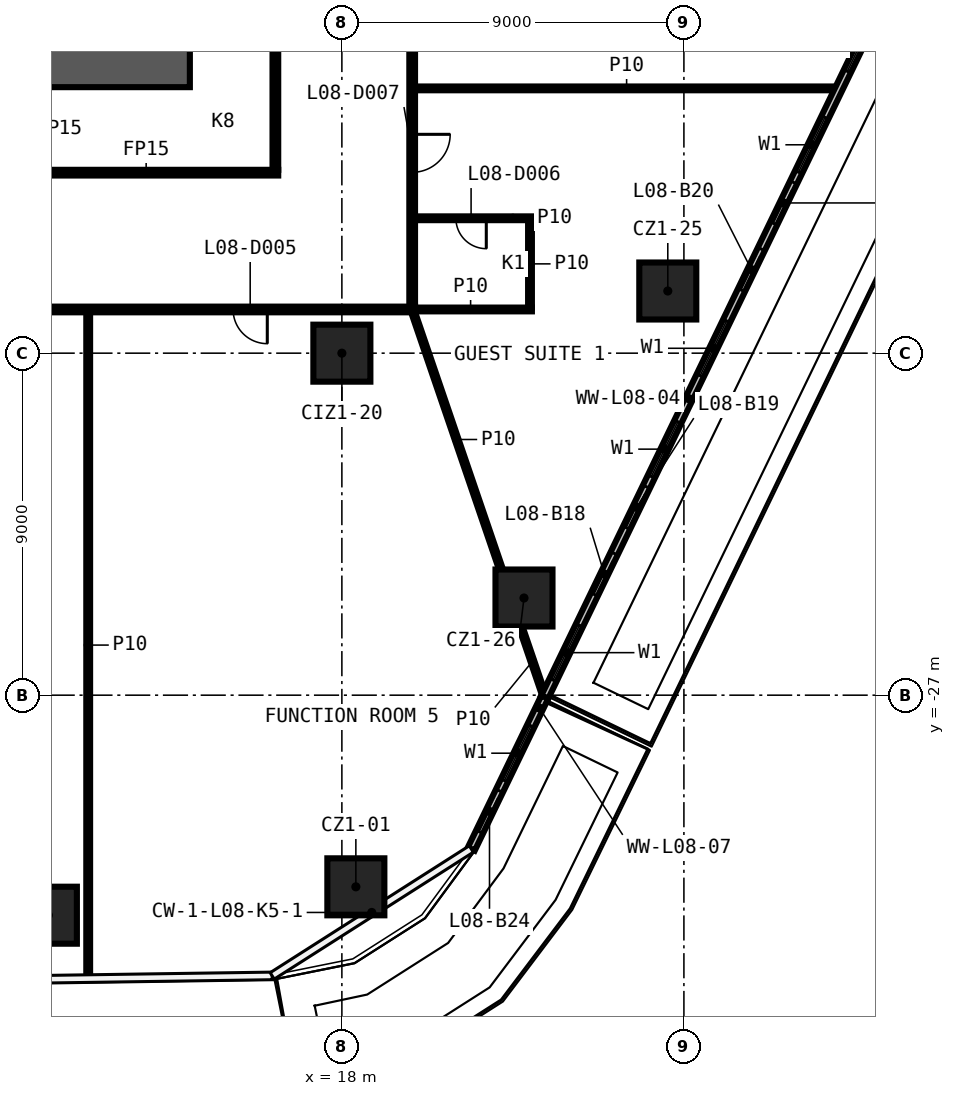
"""IFC4 building model, lengths in metres.
Left out: names, types, materials, properties, quantities, classifications, styles, units other than length and angle.
Written with IfcOpenShell. Run it as: python <this file> out.ifc"""

import sys

from ifc_helpers import new_model, si_unit, direction, frame, frame_2d, origin, origin_2d, place, context, subcontext, project, spatial, rectangle, extrude, element, fill, save


model = new_model("IFC4")
c1 = context("Model", 3, precision=1e-05, world=origin(), true_north=direction((0.0, 1.0)))
c2 = subcontext(c1, "Body", "Model", "MODEL_VIEW")
j1 = project(units=[si_unit("LENGTHUNIT", "METRE"), si_unit("PLANEANGLEUNIT", "RADIAN")], contexts=[c1])
p1 = place(None, origin())
s1 = spatial("IfcSite", under=j1, at=p1, CompositionType="ELEMENT")
p2 = place(p1, origin())
s2 = spatial("IfcBuilding", under=s1, at=p2, CompositionType="ELEMENT")
p3 = place(p2, frame((0.0, 0.0, 51.4)))
s3 = spatial("IfcBuildingStorey", under=s2, at=p3, CompositionType="ELEMENT", Elevation=51.4)
for number, where, z_axis, x_axis in (
    (1, (18.368, -32.043, 0.0), (0.0, 0.0, 1.0), (1.0, 0.0, 0.0)),
    (2, (10.277, -32.79, 0.0), (0.0, 0.0, 1.0), (1.0, 0.0, 0.0)),
    (3, (26.576, -16.364, 0.0), (0.0, 0.0, 1.0), (1.0, 0.0, 0.0)),
    (4, (22.792, -24.443, 0.0), (0.0, 0.0, 1.0), (1.0, 0.0, 0.0)),
    (5, (18.0, -18.0, 0.0), (0.0, 0.0, 1.0), (1.0, 0.0, 0.0)),
):
    element("IfcColumn", number, at=place(p3, frame(where, z_axis=z_axis, x_axis=x_axis)), inside=s3, PredefinedType="COLUMN", context=c2, shape_type="SweptSolid", body=[
        extrude(rectangle(XDim=1.5, YDim=1.5, at=origin_2d()), origin(), (0.0, 0.0, 1.0), 3.3),
    ])
p4 = place(p3, frame((19.925, -16.85, 0.0), z_axis=(0.0, 0.0, 1.0), x_axis=(-1.0, 0.0, 0.0)))
e6 = element("IfcWall", 6, at=p4, inside=s3, PredefinedType="PARTITIONING", context=c2, shape_type="SweptSolid", body=[
    extrude(rectangle(XDim=39.85, YDim=0.15, at=frame_2d((19.925, 0.0))), origin(), (0.0, 0.0, 1.0), 3.3),
])
p5 = place(p4, frame((31.008, 0.0, 0.0)))
e7 = element("IfcOpeningElement", 7, at=p5, cuts=e6, PredefinedType="OPENING", context=c2, shape_type="SweptSolid", body=[
    extrude(rectangle(XDim=0.9, YDim=2.1, at=frame_2d((0.45, 1.05))), frame((0.0, 0.085, 0.0), z_axis=(0.0, -1.0, 0.0), x_axis=(1.0, 0.0, 0.0)), (0.0, 0.0, 1.0), 0.17),
])
p6 = place(p4, frame((22.704, 0.0, 0.0)))
e8 = element("IfcOpeningElement", 8, at=p6, cuts=e6, PredefinedType="OPENING", context=c2, shape_type="SweptSolid", body=[
    extrude(rectangle(XDim=0.9, YDim=2.1, at=frame_2d((0.45, 1.05))), frame((0.0, 0.085, 0.0), z_axis=(0.0, -1.0, 0.0), x_axis=(1.0, 0.0, 0.0)), (0.0, 0.0, 1.0), 0.17),
])
p7 = place(p4, frame((3.888, 0.0, 0.0)))
e9 = element("IfcOpeningElement", 9, at=p7, cuts=e6, PredefinedType="OPENING", context=c2, shape_type="SweptSolid", body=[
    extrude(rectangle(XDim=0.9, YDim=2.1, at=frame_2d((0.45, 1.05))), frame((0.0, 0.085, 0.0), z_axis=(0.0, -1.0, 0.0), x_axis=(1.0, 0.0, 0.0)), (0.0, 0.0, 1.0), 0.17),
])
p8 = place(p3, frame((19.775, -16.85, 0.0), z_axis=(0.0, 0.0, 1.0), x_axis=(1.0, 0.0, 0.0)))
e10 = element("IfcWall", 10, at=p8, inside=s3, PredefinedType="PARTITIONING", context=c2, shape_type="SweptSolid", body=[
    extrude(rectangle(XDim=3.225, YDim=0.1, at=frame_2d((1.613, 0.0))), origin(), (0.0, 0.0, 1.0), 3.3),
])
p9 = place(p3, frame((23.0, -14.45, 0.0), z_axis=(0.0, 0.0, 1.0), x_axis=(-1.0, 0.0, 0.0)))
e11 = element("IfcWall", 11, at=p9, inside=s3, PredefinedType="PARTITIONING", context=c2, shape_type="SweptSolid", body=[
    extrude(rectangle(XDim=3.075, YDim=0.1, at=frame_2d((1.538, 0.0))), origin(), (0.0, 0.0, 1.0), 3.3),
])
p10 = place(p9, frame((1.2, 0.0, 0.0)))
e12 = element("IfcOpeningElement", 12, at=p10, cuts=e11, PredefinedType="OPENING", context=c2, shape_type="SweptSolid", body=[
    extrude(rectangle(XDim=0.8, YDim=2.1, at=frame_2d((0.4, 1.05))), frame((0.0, 0.06, 0.0), z_axis=(0.0, -1.0, 0.0), x_axis=(1.0, 0.0, 0.0)), (0.0, 0.0, 1.0), 0.12),
])
p11 = place(p3, frame((9.375, -13.25, 0.0), z_axis=(0.0, 0.0, 1.0), x_axis=(1.0, 0.0, 0.0)))
e13 = element("IfcWall", 13, at=p11, inside=s3, PredefinedType="PARTITIONING", context=c2, shape_type="SweptSolid", body=[
    extrude(rectangle(XDim=6.95, YDim=0.15, at=frame_2d((3.475, 0.0))), origin(), (0.0, 0.0, 1.0), 3.3),
])
p12 = place(p3, frame((19.925, -11.032, 0.0), z_axis=(0.0, 0.0, 1.0), x_axis=(1.0, 0.0, 0.0)))
e14 = element("IfcWall", 14, at=p12, inside=s3, PredefinedType="PARTITIONING", context=c2, shape_type="SweptSolid", body=[
    extrude(rectangle(XDim=11.135, YDim=0.1, at=frame_2d((5.567, 0.0))), origin(), (0.0, 0.0, 1.0), 3.3),
])
p13 = place(p3, frame((22.95, -16.8, 0.0), z_axis=(0.0, 0.0, 1.0), x_axis=(0.0, 1.0, 0.0)))
e15 = element("IfcWall", 15, at=p13, inside=s3, PredefinedType="PARTITIONING", context=c2, shape_type="SweptSolid", body=[
    extrude(rectangle(XDim=2.3, YDim=0.1, at=frame_2d((1.15, 0.0))), origin(), (0.0, 0.0, 1.0), 3.3),
])
p14 = place(p3, frame((19.85, 16.775, 0.0), z_axis=(0.0, 0.0, 1.0), x_axis=(0.0, -1.0, 0.0)))
e16 = element("IfcWall", 16, at=p14, inside=s3, PredefinedType="PARTITIONING", context=c2, shape_type="SweptSolid", body=[
    extrude(rectangle(XDim=33.55, YDim=0.15, at=frame_2d((16.775, 0.0))), origin(), (0.0, 0.0, 1.0), 3.3),
])
p15 = place(p14, frame((29.016, 0.0, 0.0)))
e17 = element("IfcOpeningElement", 17, at=p15, cuts=e16, PredefinedType="OPENING", context=c2, shape_type="SweptSolid", body=[
    extrude(rectangle(XDim=1.0, YDim=2.1, at=frame_2d((0.5, 1.05))), frame((0.0, 0.085, 0.0), z_axis=(0.0, -1.0, 0.0), x_axis=(1.0, 0.0, 0.0)), (0.0, 0.0, 1.0), 0.17),
])
p16 = place(p14, frame((20.1, 0.0, 0.0)))
e18 = element("IfcOpeningElement", 18, at=p16, cuts=e16, PredefinedType="OPENING", context=c2, shape_type="SweptSolid", body=[
    extrude(rectangle(XDim=1.0, YDim=2.1, at=frame_2d((0.5, 1.05))), frame((0.0, 0.085, 0.0), z_axis=(0.0, -1.0, 0.0), x_axis=(1.0, 0.0, 0.0)), (0.0, 0.0, 1.0), 0.17),
])
p17 = place(p14, frame((18.446, 0.0, 0.0)))
e19 = element("IfcOpeningElement", 19, at=p17, cuts=e16, PredefinedType="OPENING", context=c2, shape_type="SweptSolid", body=[
    extrude(rectangle(XDim=1.0, YDim=2.1, at=frame_2d((0.5, 1.05))), frame((0.0, 0.085, 0.0), z_axis=(0.0, -1.0, 0.0), x_axis=(1.0, 0.0, 0.0)), (0.0, 0.0, 1.0), 0.17),
])
p18 = place(p14, frame((4.143, 0.0, 0.0)))
e20 = element("IfcOpeningElement", 20, at=p18, cuts=e16, PredefinedType="OPENING", context=c2, shape_type="SweptSolid", body=[
    extrude(rectangle(XDim=0.9, YDim=2.1, at=frame_2d((0.45, 1.05))), frame((0.0, 0.085, 0.0), z_axis=(0.0, -1.0, 0.0), x_axis=(1.0, 0.0, 0.0)), (0.0, 0.0, 1.0), 0.17),
])
p19 = place(p3, frame((16.25, -13.175, 0.0), z_axis=(0.0, 0.0, 1.0), x_axis=(0.0, 1.0, 0.0)))
e21 = element("IfcWall", 21, at=p19, inside=s3, PredefinedType="PARTITIONING", context=c2, shape_type="SweptSolid", body=[
    extrude(rectangle(XDim=26.35, YDim=0.15, at=frame_2d((13.175, 0.0))), origin(), (0.0, 0.0, 1.0), 3.3),
])
p20 = place(p19, frame((8.225, 0.0, 0.0)))
e22 = element("IfcOpeningElement", 22, at=p20, cuts=e21, PredefinedType="OPENING", context=c2, shape_type="SweptSolid", body=[
    extrude(rectangle(XDim=0.9, YDim=2.1, at=frame_2d((0.45, 1.05))), frame((0.0, 0.085, 0.0), z_axis=(0.0, -1.0, 0.0), x_axis=(1.0, 0.0, 0.0)), (0.0, 0.0, 1.0), 0.17),
])
p21 = place(p19, frame((17.225, 0.0, 0.0)))
e23 = element("IfcOpeningElement", 23, at=p21, cuts=e21, PredefinedType="OPENING", context=c2, shape_type="SweptSolid", body=[
    extrude(rectangle(XDim=0.9, YDim=2.1, at=frame_2d((0.45, 1.05))), frame((0.0, 0.085, 0.0), z_axis=(0.0, -1.0, 0.0), x_axis=(1.0, 0.0, 0.0)), (0.0, 0.0, 1.0), 0.17),
])
p22 = place(p3, frame((11.325, -34.438, 0.0), z_axis=(0.0, 0.0, 1.0), x_axis=(0.0, 1.0, 0.0)))
e24 = element("IfcWall", 24, at=p22, inside=s3, PredefinedType="PARTITIONING", context=c2, shape_type="SweptSolid", body=[
    extrude(rectangle(XDim=17.513, YDim=0.1, at=frame_2d((8.757, 0.0))), origin(), (0.0, 0.0, 1.0), 3.3),
])
p23 = place(p3, frame((19.85, -16.85, 0.0), z_axis=(0.0, 0.0, 1.0), x_axis=(0.323389409091, -0.94626597217, 0.0)))
e25 = element("IfcWall", 25, at=p23, inside=s3, PredefinedType="PARTITIONING", context=c2, shape_type="SweptSolid", body=[
    extrude(rectangle(XDim=7.232, YDim=0.1, at=frame_2d((3.616, 0.0))), origin(), (0.0, 0.0, 1.0), 3.3),
])
p24 = place(p3, frame((22.701, -25.193, 0.0), z_axis=(0.0, 0.0, 1.0), x_axis=(0.323521274284, -0.94622089656, 0.0)))
e26 = element("IfcWall", 26, at=p24, inside=s3, PredefinedType="PARTITIONING", context=c2, shape_type="SweptSolid", body=[
    extrude(rectangle(XDim=1.936, YDim=0.1, at=frame_2d((0.968, 0.0))), origin(), (0.0, 0.0, 1.0), 3.3),
])
p25 = place(p3, frame((23.338, -27.051, 0.0), z_axis=(0.0, 0.0, 1.0), x_axis=(0.43524886879, 0.900310181114, 0.0)))
e27 = element("IfcWall", 27, at=p25, inside=s3, PredefinedType="SOLIDWALL", context=c2, shape_type="SweptSolid", body=[
    extrude(rectangle(XDim=26.689, YDim=0.2, at=frame_2d((13.344, 0.0))), origin(), (0.0, 0.0, 1.0), 3.3),
])
p26 = place(p25, frame((0.5, 0.0, 0.6)))
e28 = element("IfcOpeningElement", 28, at=p26, cuts=e27, PredefinedType="OPENING", context=c2, shape_type="SweptSolid", body=[
    extrude(rectangle(XDim=1.6, YDim=2.4, at=frame_2d((0.8, 1.2))), frame((0.0, 0.11, 0.0), z_axis=(0.0, -1.0, 0.0), x_axis=(1.0, 0.0, 0.0)), (0.0, 0.0, 1.0), 0.22),
])
p27 = place(p25, frame((3.0, 0.0, 0.0)))
e29 = element("IfcOpeningElement", 29, at=p27, cuts=e27, PredefinedType="OPENING", context=c2, shape_type="SweptSolid", body=[
    extrude(rectangle(XDim=1.2, YDim=2.4, at=frame_2d((0.6, 1.2))), frame((0.0, 0.11, 0.0), z_axis=(0.0, -1.0, 0.0), x_axis=(1.0, 0.0, 0.0)), (0.0, 0.0, 1.0), 0.22),
])
p28 = place(p25, frame((6.448, 0.0, 0.6)))
e30 = element("IfcOpeningElement", 30, at=p28, cuts=e27, PredefinedType="OPENING", context=c2, shape_type="SweptSolid", body=[
    extrude(rectangle(XDim=1.6, YDim=2.4, at=frame_2d((0.8, 1.2))), frame((0.0, 0.11, 0.0), z_axis=(0.0, -1.0, 0.0), x_axis=(1.0, 0.0, 0.0)), (0.0, 0.0, 1.0), 0.22),
])
p29 = place(p25, frame((4.948, 0.0, 0.0)))
e31 = element("IfcOpeningElement", 31, at=p29, cuts=e27, PredefinedType="OPENING", context=c2, shape_type="SweptSolid", body=[
    extrude(rectangle(XDim=1.2, YDim=2.4, at=frame_2d((0.6, 1.2))), frame((0.0, 0.11, 0.0), z_axis=(0.0, -1.0, 0.0), x_axis=(1.0, 0.0, 0.0)), (0.0, 0.0, 1.0), 0.22),
])
p30 = place(p25, frame((9.396, 0.0, 0.6)))
e32 = element("IfcOpeningElement", 32, at=p30, cuts=e27, PredefinedType="OPENING", context=c2, shape_type="SweptSolid", body=[
    extrude(rectangle(XDim=1.6, YDim=2.4, at=frame_2d((0.8, 1.2))), frame((0.0, 0.11, 0.0), z_axis=(0.0, -1.0, 0.0), x_axis=(1.0, 0.0, 0.0)), (0.0, 0.0, 1.0), 0.22),
])
p31 = place(p25, frame((11.896, 0.0, 0.0)))
e33 = element("IfcOpeningElement", 33, at=p31, cuts=e27, PredefinedType="OPENING", context=c2, shape_type="SweptSolid", body=[
    extrude(rectangle(XDim=1.2, YDim=2.4, at=frame_2d((0.6, 1.2))), frame((0.0, 0.11, 0.0), z_axis=(0.0, -1.0, 0.0), x_axis=(1.0, 0.0, 0.0)), (0.0, 0.0, 1.0), 0.22),
])
p32 = place(p25, frame((15.344, 0.0, 0.6)))
e34 = element("IfcOpeningElement", 34, at=p32, cuts=e27, PredefinedType="OPENING", context=c2, shape_type="SweptSolid", body=[
    extrude(rectangle(XDim=1.6, YDim=2.4, at=frame_2d((0.8, 1.2))), frame((0.0, 0.11, 0.0), z_axis=(0.0, -1.0, 0.0), x_axis=(1.0, 0.0, 0.0)), (0.0, 0.0, 1.0), 0.22),
])
p33 = place(p25, frame((13.844, 0.0, 0.0)))
e35 = element("IfcOpeningElement", 35, at=p33, cuts=e27, PredefinedType="OPENING", context=c2, shape_type="SweptSolid", body=[
    extrude(rectangle(XDim=1.2, YDim=2.4, at=frame_2d((0.6, 1.2))), frame((0.0, 0.11, 0.0), z_axis=(0.0, -1.0, 0.0), x_axis=(1.0, 0.0, 0.0)), (0.0, 0.0, 1.0), 0.22),
])
p34 = place(p25, frame((18.292, 0.0, 0.6)))
e36 = element("IfcOpeningElement", 36, at=p34, cuts=e27, PredefinedType="OPENING", context=c2, shape_type="SweptSolid", body=[
    extrude(rectangle(XDim=1.6, YDim=2.4, at=frame_2d((0.8, 1.2))), frame((0.0, 0.11, 0.0), z_axis=(0.0, -1.0, 0.0), x_axis=(1.0, 0.0, 0.0)), (0.0, 0.0, 1.0), 0.22),
])
p35 = place(p25, frame((20.692, 0.0, 0.0)))
e37 = element("IfcOpeningElement", 37, at=p35, cuts=e27, PredefinedType="OPENING", context=c2, shape_type="SweptSolid", body=[
    extrude(rectangle(XDim=1.2, YDim=2.4, at=frame_2d((0.6, 1.2))), frame((0.0, 0.11, 0.0), z_axis=(0.0, -1.0, 0.0), x_axis=(1.0, 0.0, 0.0)), (0.0, 0.0, 1.0), 0.22),
])
p36 = place(p25, frame((24.24, 0.0, 0.6)))
e38 = element("IfcOpeningElement", 38, at=p36, cuts=e27, PredefinedType="OPENING", context=c2, shape_type="SweptSolid", body=[
    extrude(rectangle(XDim=1.6, YDim=2.4, at=frame_2d((0.8, 1.2))), frame((0.0, 0.11, 0.0), z_axis=(0.0, -1.0, 0.0), x_axis=(1.0, 0.0, 0.0)), (0.0, 0.0, 1.0), 0.22),
])
p37 = place(p25, frame((22.74, 0.0, 0.0)))
e39 = element("IfcOpeningElement", 39, at=p37, cuts=e27, PredefinedType="OPENING", context=c2, shape_type="SweptSolid", body=[
    extrude(rectangle(XDim=1.2, YDim=2.4, at=frame_2d((0.6, 1.2))), frame((0.0, 0.11, 0.0), z_axis=(0.0, -1.0, 0.0), x_axis=(1.0, 0.0, 0.0)), (0.0, 0.0, 1.0), 0.22),
])
p38 = place(p3, frame((21.406, -31.048, 0.0), z_axis=(0.0, 0.0, 1.0), x_axis=(0.435227364278, 0.900320577008, 0.0)))
e40 = element("IfcWall", 40, at=p38, inside=s3, PredefinedType="SOLIDWALL", context=c2, shape_type="SweptSolid", body=[
    extrude(rectangle(XDim=4.439, YDim=0.2, at=frame_2d((2.219, 0.0))), origin(), (0.0, 0.0, 1.0), 3.3),
])
p39 = place(p38, frame((2.0, 0.0, 0.6)))
e41 = element("IfcOpeningElement", 41, at=p39, cuts=e40, PredefinedType="OPENING", context=c2, shape_type="SweptSolid", body=[
    extrude(rectangle(XDim=1.6, YDim=2.4, at=frame_2d((0.8, 1.2))), frame((0.0, 0.11, 0.0), z_axis=(0.0, -1.0, 0.0), x_axis=(1.0, 0.0, 0.0)), (0.0, 0.0, 1.0), 0.22),
])
p40 = place(p38, frame((0.5, 0.0, 0.0)))
e42 = element("IfcOpeningElement", 42, at=p40, cuts=e40, PredefinedType="OPENING", context=c2, shape_type="SweptSolid", body=[
    extrude(rectangle(XDim=1.2, YDim=2.4, at=frame_2d((0.6, 1.2))), frame((0.0, 0.11, 0.0), z_axis=(0.0, -1.0, 0.0), x_axis=(1.0, 0.0, 0.0)), (0.0, 0.0, 1.0), 0.22),
])
p41 = place(p3, frame((14.0, -10.4, 0.0), z_axis=(0.0, 0.0, 1.0), x_axis=(-1.0, 0.0, 0.0)))
e43 = element("IfcWall", 43, at=p41, inside=s3, PredefinedType="SHEAR", context=c2, shape_type="SweptSolid", body=[
    extrude(rectangle(XDim=28.0, YDim=1.2, at=frame_2d((14.0, 0.0))), origin(), (0.0, 0.0, 1.0), 3.3),
])
p42 = place(p41, frame((5.1, 0.0, 0.0)))
e44 = element("IfcOpeningElement", 44, at=p42, cuts=e43, PredefinedType="OPENING", context=c2, shape_type="SweptSolid", body=[
    extrude(rectangle(XDim=1.6, YDim=2.1, at=frame_2d((0.8, 1.05))), frame((0.0, 0.61, 0.0), z_axis=(0.0, -1.0, 0.0), x_axis=(1.0, 0.0, 0.0)), (0.0, 0.0, 1.0), 1.22),
])
p43 = place(p7, origin())
e45 = element("IfcDoor", 45, at=p43, inside=s3, OperationType="SINGLE_SWING_LEFT", PredefinedType="DOOR", context=c2, shape_type="SweptSolid", body=[
    extrude(rectangle(XDim=0.9, YDim=2.1, at=frame_2d((0.45, 1.05))), frame((0.0, 0.025, 0.0), z_axis=(0.0, -1.0, 0.0), x_axis=(1.0, 0.0, 0.0)), (0.0, 0.0, 1.0), 0.05),
])
fill(e9, e45)
p44 = place(p10, origin())
e46 = element("IfcDoor", 46, at=p44, inside=s3, OperationType="SINGLE_SWING_LEFT", PredefinedType="DOOR", context=c2, shape_type="SweptSolid", body=[
    extrude(rectangle(XDim=0.8, YDim=2.1, at=frame_2d((0.4, 1.05))), frame((0.0, 0.025, 0.0), z_axis=(0.0, -1.0, 0.0), x_axis=(1.0, 0.0, 0.0)), (0.0, 0.0, 1.0), 0.05),
])
fill(e12, e46)
p45 = place(p15, origin())
e47 = element("IfcDoor", 47, at=p45, inside=s3, OperationType="SINGLE_SWING_RIGHT", PredefinedType="DOOR", context=c2, shape_type="SweptSolid", body=[
    extrude(rectangle(XDim=1.0, YDim=2.1, at=frame_2d((0.5, 1.05))), frame((0.0, 0.025, 0.0), z_axis=(0.0, -1.0, 0.0), x_axis=(1.0, 0.0, 0.0)), (0.0, 0.0, 1.0), 0.05),
])
fill(e17, e47)
p46 = place(p26, origin())
e48 = element("IfcWindow", 48, at=p46, inside=s3, PartitioningType="SINGLE_PANEL", PredefinedType="WINDOW", context=c2, shape_type="SweptSolid", body=[
    extrude(rectangle(XDim=1.6, YDim=2.4, at=frame_2d((0.8, 1.2))), frame((0.0, 0.03, 0.0), z_axis=(0.0, -1.0, 0.0), x_axis=(1.0, 0.0, 0.0)), (0.0, 0.0, 1.0), 0.06),
])
fill(e28, e48)
p47 = place(p27, origin())
e49 = element("IfcDoor", 49, at=p47, inside=s3, OperationType="SLIDING_TO_LEFT", PredefinedType="DOOR", context=c2, shape_type="SweptSolid", body=[
    extrude(rectangle(XDim=1.2, YDim=2.4, at=frame_2d((0.6, 1.2))), frame((0.0, 0.025, 0.0), z_axis=(0.0, -1.0, 0.0), x_axis=(1.0, 0.0, 0.0)), (0.0, 0.0, 1.0), 0.05),
])
fill(e29, e49)
p48 = place(p28, origin())
e50 = element("IfcWindow", 50, at=p48, inside=s3, PartitioningType="SINGLE_PANEL", PredefinedType="WINDOW", context=c2, shape_type="SweptSolid", body=[
    extrude(rectangle(XDim=1.6, YDim=2.4, at=frame_2d((0.8, 1.2))), frame((0.0, 0.03, 0.0), z_axis=(0.0, -1.0, 0.0), x_axis=(1.0, 0.0, 0.0)), (0.0, 0.0, 1.0), 0.06),
])
fill(e30, e50)
p49 = place(p29, origin())
e51 = element("IfcDoor", 51, at=p49, inside=s3, OperationType="SLIDING_TO_LEFT", PredefinedType="DOOR", context=c2, shape_type="SweptSolid", body=[
    extrude(rectangle(XDim=1.2, YDim=2.4, at=frame_2d((0.6, 1.2))), frame((0.0, 0.025, 0.0), z_axis=(0.0, -1.0, 0.0), x_axis=(1.0, 0.0, 0.0)), (0.0, 0.0, 1.0), 0.05),
])
fill(e31, e51)
p50 = place(p30, origin())
e52 = element("IfcWindow", 52, at=p50, inside=s3, PartitioningType="SINGLE_PANEL", PredefinedType="WINDOW", context=c2, shape_type="SweptSolid", body=[
    extrude(rectangle(XDim=1.6, YDim=2.4, at=frame_2d((0.8, 1.2))), frame((0.0, 0.03, 0.0), z_axis=(0.0, -1.0, 0.0), x_axis=(1.0, 0.0, 0.0)), (0.0, 0.0, 1.0), 0.06),
])
fill(e32, e52)
p51 = place(p31, origin())
e53 = element("IfcDoor", 53, at=p51, inside=s3, OperationType="SLIDING_TO_LEFT", PredefinedType="DOOR", context=c2, shape_type="SweptSolid", body=[
    extrude(rectangle(XDim=1.2, YDim=2.4, at=frame_2d((0.6, 1.2))), frame((0.0, 0.025, 0.0), z_axis=(0.0, -1.0, 0.0), x_axis=(1.0, 0.0, 0.0)), (0.0, 0.0, 1.0), 0.05),
])
fill(e33, e53)
p52 = place(p32, origin())
e54 = element("IfcWindow", 54, at=p52, inside=s3, PartitioningType="SINGLE_PANEL", PredefinedType="WINDOW", context=c2, shape_type="SweptSolid", body=[
    extrude(rectangle(XDim=1.6, YDim=2.4, at=frame_2d((0.8, 1.2))), frame((0.0, 0.03, 0.0), z_axis=(0.0, -1.0, 0.0), x_axis=(1.0, 0.0, 0.0)), (0.0, 0.0, 1.0), 0.06),
])
fill(e34, e54)
p53 = place(p33, origin())
e55 = element("IfcDoor", 55, at=p53, inside=s3, OperationType="SLIDING_TO_LEFT", PredefinedType="DOOR", context=c2, shape_type="SweptSolid", body=[
    extrude(rectangle(XDim=1.2, YDim=2.4, at=frame_2d((0.6, 1.2))), frame((0.0, 0.025, 0.0), z_axis=(0.0, -1.0, 0.0), x_axis=(1.0, 0.0, 0.0)), (0.0, 0.0, 1.0), 0.05),
])
fill(e35, e55)
p54 = place(p34, origin())
e56 = element("IfcWindow", 56, at=p54, inside=s3, PartitioningType="SINGLE_PANEL", PredefinedType="WINDOW", context=c2, shape_type="SweptSolid", body=[
    extrude(rectangle(XDim=1.6, YDim=2.4, at=frame_2d((0.8, 1.2))), frame((0.0, 0.03, 0.0), z_axis=(0.0, -1.0, 0.0), x_axis=(1.0, 0.0, 0.0)), (0.0, 0.0, 1.0), 0.06),
])
fill(e36, e56)
p55 = place(p39, origin())
e57 = element("IfcWindow", 57, at=p55, inside=s3, PartitioningType="SINGLE_PANEL", PredefinedType="WINDOW", context=c2, shape_type="SweptSolid", body=[
    extrude(rectangle(XDim=1.6, YDim=2.4, at=frame_2d((0.8, 1.2))), frame((0.0, 0.03, 0.0), z_axis=(0.0, -1.0, 0.0), x_axis=(1.0, 0.0, 0.0)), (0.0, 0.0, 1.0), 0.06),
])
fill(e41, e57)
p56 = place(p40, origin())
e58 = element("IfcDoor", 58, at=p56, inside=s3, OperationType="SLIDING_TO_LEFT", PredefinedType="DOOR", context=c2, shape_type="SweptSolid", body=[
    extrude(rectangle(XDim=1.2, YDim=2.4, at=frame_2d((0.6, 1.2))), frame((0.0, 0.025, 0.0), z_axis=(0.0, -1.0, 0.0), x_axis=(1.0, 0.0, 0.0)), (0.0, 0.0, 1.0), 0.05),
])
fill(e42, e58)
save(model, sys.argv[1])
